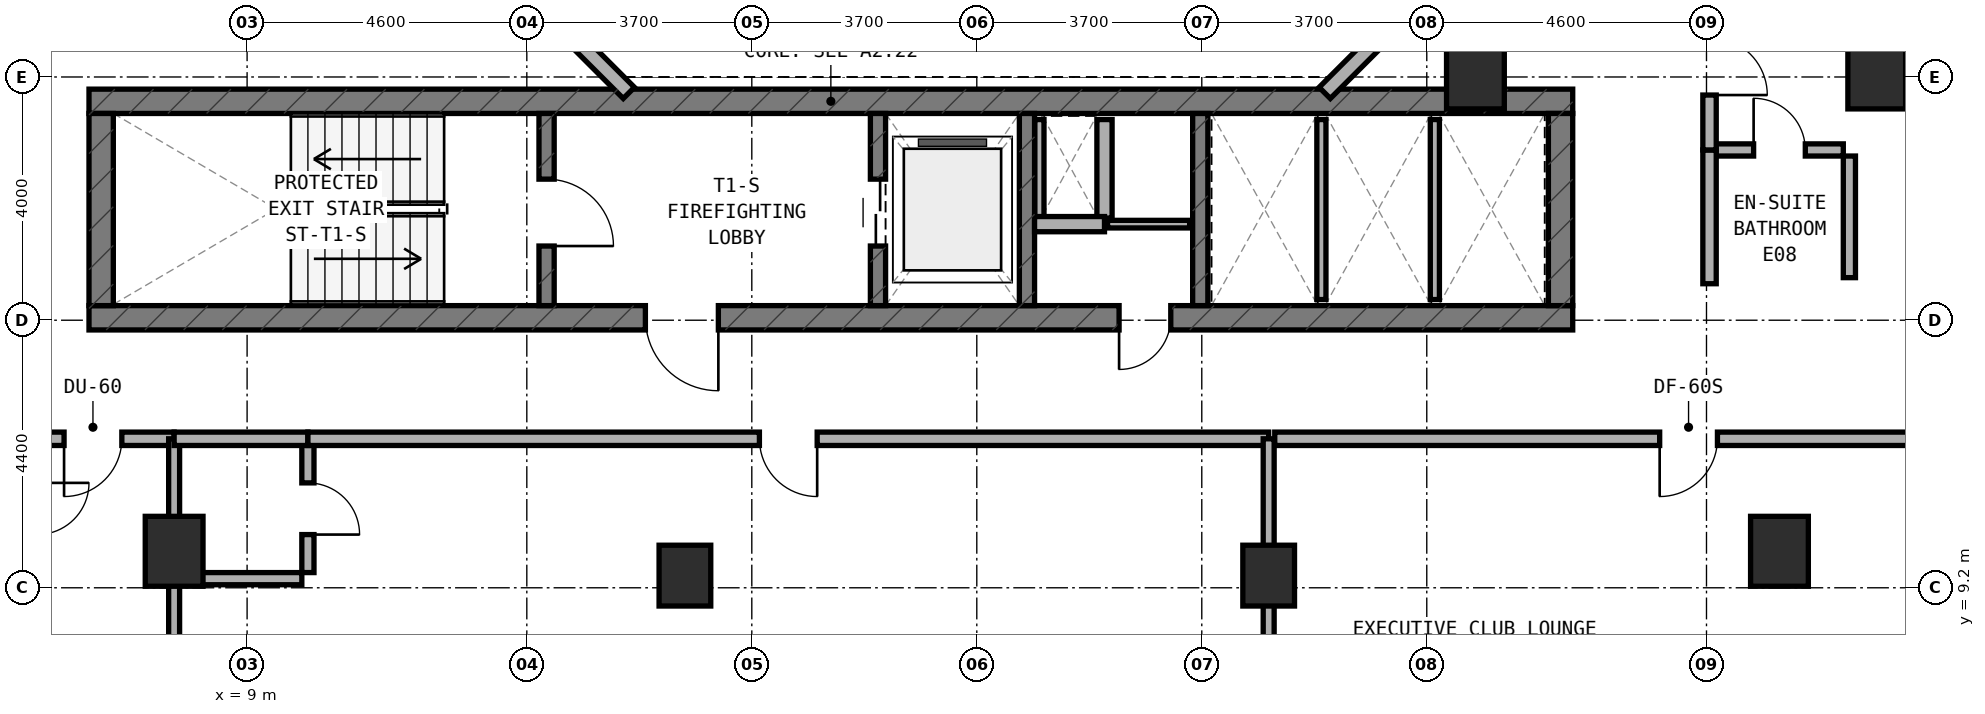
"""IFC4 building model, lengths in metres.
Left out: names, types, materials, properties, quantities, classifications, styles, units other than length and angle.
Written with IfcOpenShell. Run it as: python <this file> out.ifc"""

import sys

from ifc_helpers import new_model, si_unit, direction, frame, frame_2d, origin, origin_2d, place, context, subcontext, project, spatial, rectangle, extrude, element, fill, save


model = new_model("IFC4")
c1 = context("Model", 3, precision=1e-05, world=origin(), true_north=direction((0.0, 1.0)))
c2 = subcontext(c1, "Body", "Model", "MODEL_VIEW")
j1 = project(units=[si_unit("LENGTHUNIT", "METRE"), si_unit("PLANEANGLEUNIT", "RADIAN")], contexts=[c1])
p1 = place(None, origin())
s1 = spatial("IfcSite", under=j1, at=p1, CompositionType="ELEMENT")
p2 = place(p1, origin())
s2 = spatial("IfcBuilding", under=s1, at=p2, CompositionType="ELEMENT")
p3 = place(p2, frame((0.0, 0.0, 95.0)))
s3 = spatial("IfcBuildingStorey", under=s2, at=p3, CompositionType="ELEMENT", Elevation=95.0)
p4 = place(p3, frame((6.4, 13.64, 0.0), z_axis=(0.0, 0.0, 1.0), x_axis=(1.0, 0.0, 0.0)))
e1 = element("IfcWall", 1, at=p4, inside=s3, PredefinedType="SHEAR", context=c2, shape_type="SweptSolid", body=[
    extrude(rectangle(XDim=24.4, YDim=0.4, at=frame_2d((12.2, 0.0))), origin(), (0.0, 0.0, 1.0), 3.5),
])
p5 = place(p4, frame((9.15, 0.0, 0.0)))
e2 = element("IfcOpeningElement", 2, at=p5, cuts=e1, PredefinedType="OPENING", context=c2, shape_type="SweptSolid", body=[
    extrude(rectangle(XDim=1.2, YDim=2.15, at=frame_2d((0.6, 1.075))), frame((0.0, 0.21, 0.0), z_axis=(0.0, -1.0, 0.0), x_axis=(1.0, 0.0, 0.0)), (0.0, 0.0, 1.0), 0.42),
])
p6 = place(p4, frame((16.94, 0.0, 0.0)))
e3 = element("IfcOpeningElement", 3, at=p6, cuts=e1, PredefinedType="OPENING", context=c2, shape_type="SweptSolid", body=[
    extrude(rectangle(XDim=0.85, YDim=2.1, at=frame_2d((0.425, 1.05))), frame((0.0, 0.21, 0.0), z_axis=(0.0, -1.0, 0.0), x_axis=(1.0, 0.0, 0.0)), (0.0, 0.0, 1.0), 0.42),
])
p7 = place(p3, frame((6.4, 17.2, 0.0), z_axis=(0.0, 0.0, 1.0), x_axis=(1.0, 0.0, 0.0)))
e4 = element("IfcWall", 4, at=p7, inside=s3, PredefinedType="SHEAR", context=c2, shape_type="SweptSolid", body=[
    extrude(rectangle(XDim=24.4, YDim=0.4, at=frame_2d((12.2, 0.0))), origin(), (0.0, 0.0, 1.0), 3.5),
])
for number, where, z_axis, x_axis in (
    (5, (6.6, 13.84, 0.0), (0.0, 0.0, 1.0), (0.0, 1.0, 0.0)),
    (6, (30.6, 13.84, 0.0), (0.0, 0.0, 1.0), (0.0, 1.0, 0.0)),
):
    element("IfcWall", number, at=place(p3, frame(where, z_axis=z_axis, x_axis=x_axis)), inside=s3, PredefinedType="SHEAR", context=c2, shape_type="SweptSolid", body=[
        extrude(rectangle(XDim=3.16, YDim=0.4, at=frame_2d((1.58, 0.0))), origin(), (0.0, 0.0, 1.0), 3.5),
    ])
p8 = place(p3, frame((13.925, 13.84, 0.0), z_axis=(0.0, 0.0, 1.0), x_axis=(0.0, 1.0, 0.0)))
e7 = element("IfcWall", 7, at=p8, inside=s3, PredefinedType="STANDARD", context=c2, shape_type="SweptSolid", body=[
    extrude(rectangle(XDim=3.16, YDim=0.25, at=frame_2d((1.58, 0.0))), origin(), (0.0, 0.0, 1.0), 3.22),
])
p9 = place(p8, frame((0.98, 0.0, 0.0)))
e8 = element("IfcOpeningElement", 8, at=p9, cuts=e7, PredefinedType="OPENING", context=c2, shape_type="SweptSolid", body=[
    extrude(rectangle(XDim=1.1, YDim=2.15, at=frame_2d((0.55, 1.075))), frame((0.0, 0.135, 0.0), z_axis=(0.0, -1.0, 0.0), x_axis=(1.0, 0.0, 0.0)), (0.0, 0.0, 1.0), 0.27),
])
p10 = place(p3, frame((19.375, 13.84, 0.0), z_axis=(0.0, 0.0, 1.0), x_axis=(0.0, 1.0, 0.0)))
e9 = element("IfcWall", 9, at=p10, inside=s3, PredefinedType="STANDARD", context=c2, shape_type="SweptSolid", body=[
    extrude(rectangle(XDim=3.16, YDim=0.25, at=frame_2d((1.58, 0.0))), origin(), (0.0, 0.0, 1.0), 3.22),
])
p11 = place(p10, frame((0.98, 0.0, 0.0)))
e10 = element("IfcOpeningElement", 10, at=p11, cuts=e9, PredefinedType="OPENING", context=c2, shape_type="SweptSolid", body=[
    extrude(rectangle(XDim=1.1, YDim=2.15, at=frame_2d((0.55, 1.075))), frame((0.0, 0.135, 0.0), z_axis=(0.0, -1.0, 0.0), x_axis=(1.0, 0.0, 0.0)), (0.0, 0.0, 1.0), 0.27),
])
for number, where, z_axis, x_axis in (
    (11, (21.825, 13.84, 0.0), (0.0, 0.0, 1.0), (0.0, 1.0, 0.0)),
    (12, (24.675, 13.84, 0.0), (0.0, 0.0, 1.0), (0.0, 1.0, 0.0)),
):
    element("IfcWall", number, at=place(p3, frame(where, z_axis=z_axis, x_axis=x_axis)), inside=s3, PredefinedType="STANDARD", context=c2, shape_type="SweptSolid", body=[
        extrude(rectangle(XDim=3.16, YDim=0.25, at=frame_2d((1.58, 0.0))), origin(), (0.0, 0.0, 1.0), 3.22),
    ])
for number, where, z_axis, x_axis in (
    (13, (16.2, 9.4, 0.0), (0.0, 0.0, 1.0), (1.0, 0.0, 0.0)),
    (14, (25.8, 9.4, 0.0), (0.0, 0.0, 1.0), (1.0, 0.0, 0.0)),
):
    element("IfcColumn", number, at=place(p3, frame(where, z_axis=z_axis, x_axis=x_axis)), inside=s3, PredefinedType="COLUMN", context=c2, shape_type="SweptSolid", body=[
        extrude(rectangle(XDim=0.85, YDim=1.0, at=origin_2d()), origin(), (0.0, 0.0, 1.0), 3.5),
    ])
for number, where, z_axis, x_axis in (
    (15, (7.8, 9.8, 0.0), (0.0, 0.0, 1.0), (1.0, 0.0, 0.0)),
    (16, (34.2, 9.8, 0.0), (0.0, 0.0, 1.0), (1.0, 0.0, 0.0)),
    (17, (35.8, 17.65, 0.0), (0.0, 0.0, 1.0), (1.0, 0.0, 0.0)),
    (18, (29.2, 17.65, 0.0), (0.0, 0.0, 1.0), (1.0, 0.0, 0.0)),
):
    element("IfcColumn", number, at=place(p3, frame(where, z_axis=z_axis, x_axis=x_axis)), inside=s3, PredefinedType="COLUMN", context=c2, shape_type="SweptSolid", body=[
        extrude(rectangle(XDim=0.95, YDim=1.15, at=origin_2d()), origin(), (0.0, 0.0, 1.0), 3.5),
    ])
for number, where, z_axis, x_axis in (
    (19, (26.722, 17.338, 0.0), (0.0, 0.0, 1.0), (0.707, 0.707, 0.0)),
    (20, (13.444, 19.172, 0.0), (0.0, 0.0, 1.0), (0.707, -0.707, 0.0)),
):
    element("IfcWall", number, at=place(p3, frame(where, z_axis=z_axis, x_axis=x_axis)), inside=s3, PredefinedType="STANDARD", context=c2, shape_type="SweptSolid", body=[
        extrude(rectangle(XDim=2.594, YDim=0.26, at=frame_2d((1.297, 0.0))), origin(), (0.0, 0.0, 1.0), 3.22),
    ])
p12 = place(p3, frame((22.03, 15.28, 0.0), z_axis=(0.0, 0.0, 1.0), x_axis=(0.0, 1.0, 0.0)))
e21 = element("IfcWall", 21, at=p12, inside=s3, PredefinedType="PARTITIONING", context=c2, shape_type="SweptSolid", body=[
    extrude(rectangle(XDim=1.62, YDim=0.15, at=frame_2d((0.81, 0.0))), origin(), (0.0, 0.0, 1.0), 3.22),
])
p13 = place(p3, frame((23.1, 15.28, 0.0), z_axis=(0.0, 0.0, 1.0), x_axis=(0.0, 1.0, 0.0)))
e22 = element("IfcWall", 22, at=p13, inside=s3, PredefinedType="SOLIDWALL", context=c2, shape_type="SweptSolid", body=[
    extrude(rectangle(XDim=1.62, YDim=0.25, at=frame_2d((0.81, 0.0))), origin(), (0.0, 0.0, 1.0), 3.22),
])
p14 = place(p3, frame((21.95, 15.18, 0.0), z_axis=(0.0, 0.0, 1.0), x_axis=(1.0, 0.0, 0.0)))
e23 = element("IfcWall", 23, at=p14, inside=s3, PredefinedType="SOLIDWALL", context=c2, shape_type="SweptSolid", body=[
    extrude(rectangle(XDim=1.15, YDim=0.25, at=frame_2d((0.575, 0.0))), origin(), (0.0, 0.0, 1.0), 3.22),
])
p15 = place(p3, frame((23.15, 15.18, 0.0), z_axis=(0.0, 0.0, 1.0), x_axis=(1.0, 0.0, 0.0)))
e24 = element("IfcWall", 24, at=p15, inside=s3, PredefinedType="PARTITIONING", context=c2, shape_type="SweptSolid", body=[
    extrude(rectangle(XDim=1.35, YDim=0.125, at=frame_2d((0.675, 0.0))), origin(), (0.0, 0.0, 1.0), 3.22),
])
p16 = place(p3, frame((26.667, 13.94, 0.0), z_axis=(0.0, 0.0, 1.0), x_axis=(0.0, 1.0, 0.0)))
e25 = element("IfcWall", 25, at=p16, inside=s3, PredefinedType="PARTITIONING", context=c2, shape_type="SweptSolid", body=[
    extrude(rectangle(XDim=2.96, YDim=0.15, at=frame_2d((1.48, 0.0))), origin(), (0.0, 0.0, 1.0), 3.22),
])
p17 = place(p3, frame((28.533, 13.94, 0.0), z_axis=(0.0, 0.0, 1.0), x_axis=(0.0, 1.0, 0.0)))
e26 = element("IfcWall", 26, at=p17, inside=s3, PredefinedType="PARTITIONING", context=c2, shape_type="SweptSolid", body=[
    extrude(rectangle(XDim=2.96, YDim=0.15, at=frame_2d((1.48, 0.0))), origin(), (0.0, 0.0, 1.0), 2.595),
])
p18 = place(p3, frame((5.55, 11.65, 0.0), z_axis=(0.0, 0.0, 1.0), x_axis=(1.0, 0.0, 0.0)))
e27 = element("IfcWall", 27, at=p18, inside=s3, PredefinedType="SOLIDWALL", context=c2, shape_type="SweptSolid", body=[
    extrude(rectangle(XDim=2.25, YDim=0.22, at=frame_2d((1.125, 0.0))), origin(), (0.0, 0.0, 1.0), 2.595),
])
p19 = place(p18, frame((0.44, 0.0, 0.0)))
e28 = element("IfcOpeningElement", 28, at=p19, cuts=e27, PredefinedType="OPENING", context=c2, shape_type="SweptSolid", body=[
    extrude(rectangle(XDim=0.95, YDim=2.1, at=frame_2d((0.475, 1.05))), frame((0.0, 0.12, 0.0), z_axis=(0.0, -1.0, 0.0), x_axis=(1.0, 0.0, 0.0)), (0.0, 0.0, 1.0), 0.24),
])
p20 = place(p3, frame((7.8, 6.299, 0.0), z_axis=(0.0, 0.0, 1.0), x_axis=(0.0, 1.0, 0.0)))
e29 = element("IfcWall", 29, at=p20, inside=s3, PredefinedType="SOLIDWALL", context=c2, shape_type="SweptSolid", body=[
    extrude(rectangle(XDim=5.351, YDim=0.18, at=frame_2d((2.675, 0.0))), origin(), (0.0, 0.0, 1.0), 2.595),
])
p21 = place(p3, frame((10.0, 9.45, 0.0), z_axis=(0.0, 0.0, 1.0), x_axis=(0.0, 1.0, 0.0)))
e30 = element("IfcWall", 30, at=p21, inside=s3, PredefinedType="PLUMBINGWALL", context=c2, shape_type="SweptSolid", body=[
    extrude(rectangle(XDim=2.1, YDim=0.2, at=frame_2d((1.05, 0.0))), origin(), (0.0, 0.0, 1.0), 2.835),
])
p22 = place(p21, frame((0.625, 0.0, 0.0)))
e31 = element("IfcOpeningElement", 31, at=p22, cuts=e30, PredefinedType="OPENING", context=c2, shape_type="SweptSolid", body=[
    extrude(rectangle(XDim=0.85, YDim=2.1, at=frame_2d((0.425, 1.05))), frame((0.0, 0.11, 0.0), z_axis=(0.0, -1.0, 0.0), x_axis=(1.0, 0.0, 0.0)), (0.0, 0.0, 1.0), 0.22),
])
p23 = place(p3, frame((7.9, 9.35, 0.0), z_axis=(0.0, 0.0, 1.0), x_axis=(1.0, 0.0, 0.0)))
e32 = element("IfcWall", 32, at=p23, inside=s3, PredefinedType="PLUMBINGWALL", context=c2, shape_type="SweptSolid", body=[
    extrude(rectangle(XDim=2.0, YDim=0.2, at=frame_2d((1.0, 0.0))), origin(), (0.0, 0.0, 1.0), 3.22),
])
p24 = place(p3, frame((7.8, 11.65, 0.0), z_axis=(0.0, 0.0, 1.0), x_axis=(1.0, 0.0, 0.0)))
e33 = element("IfcWall", 33, at=p24, inside=s3, PredefinedType="SOLIDWALL", context=c2, shape_type="SweptSolid", body=[
    extrude(rectangle(XDim=2.2, YDim=0.22, at=frame_2d((1.1, 0.0))), origin(), (0.0, 0.0, 1.0), 2.595),
])
p25 = place(p3, frame((10.0, 11.65, 0.0), z_axis=(0.0, 0.0, 1.0), x_axis=(1.0, 0.0, 0.0)))
e34 = element("IfcWall", 34, at=p25, inside=s3, PredefinedType="SOLIDWALL", context=c2, shape_type="SweptSolid", body=[
    extrude(rectangle(XDim=15.8, YDim=0.22, at=frame_2d((7.9, 0.0))), origin(), (0.0, 0.0, 1.0), 2.595),
])
p26 = place(p25, frame((7.425, 0.0, 0.0)))
e35 = element("IfcOpeningElement", 35, at=p26, cuts=e34, PredefinedType="OPENING", context=c2, shape_type="SweptSolid", body=[
    extrude(rectangle(XDim=0.95, YDim=2.1, at=frame_2d((0.475, 1.05))), frame((0.0, 0.12, 0.0), z_axis=(0.0, -1.0, 0.0), x_axis=(1.0, 0.0, 0.0)), (0.0, 0.0, 1.0), 0.24),
])
p27 = place(p3, frame((25.8, 4.86, 0.0), z_axis=(0.0, 0.0, 1.0), x_axis=(0.0, 1.0, 0.0)))
e36 = element("IfcWall", 36, at=p27, inside=s3, PredefinedType="SOLIDWALL", context=c2, shape_type="SweptSolid", body=[
    extrude(rectangle(XDim=6.79, YDim=0.18, at=frame_2d((3.395, 0.0))), origin(), (0.0, 0.0, 1.0), 2.595),
])
p28 = place(p3, frame((25.9, 11.65, 0.0), z_axis=(0.0, 0.0, 1.0), x_axis=(1.0, 0.0, 0.0)))
e37 = element("IfcWall", 37, at=p28, inside=s3, PredefinedType="SOLIDWALL", context=c2, shape_type="SweptSolid", body=[
    extrude(rectangle(XDim=15.04, YDim=0.22, at=frame_2d((7.52, 0.0))), origin(), (0.0, 0.0, 1.0), 2.595),
])
p29 = place(p28, frame((6.33, 0.0, 0.0)))
e38 = element("IfcOpeningElement", 38, at=p29, cuts=e37, PredefinedType="OPENING", context=c2, shape_type="SweptSolid", body=[
    extrude(rectangle(XDim=0.95, YDim=2.1, at=frame_2d((0.475, 1.05))), frame((0.0, 0.12, 0.0), z_axis=(0.0, -1.0, 0.0), x_axis=(1.0, 0.0, 0.0)), (0.0, 0.0, 1.0), 0.24),
])
p30 = place(p3, frame((33.15, 16.4, 0.0), z_axis=(0.0, 0.0, 1.0), x_axis=(1.0, 0.0, 0.0)))
e39 = element("IfcWall", 39, at=p30, inside=s3, PredefinedType="PLUMBINGWALL", context=c2, shape_type="SweptSolid", body=[
    extrude(rectangle(XDim=2.1, YDim=0.2, at=frame_2d((1.05, 0.0))), origin(), (0.0, 0.0, 1.0), 3.22),
])
p31 = place(p30, frame((0.625, 0.0, 0.0)))
e40 = element("IfcOpeningElement", 40, at=p31, cuts=e39, PredefinedType="OPENING", context=c2, shape_type="SweptSolid", body=[
    extrude(rectangle(XDim=0.85, YDim=2.1, at=frame_2d((0.425, 1.05))), frame((0.0, 0.11, 0.0), z_axis=(0.0, -1.0, 0.0), x_axis=(1.0, 0.0, 0.0)), (0.0, 0.0, 1.0), 0.22),
])
p32 = place(p3, frame((35.35, 14.3, 0.0), z_axis=(0.0, 0.0, 1.0), x_axis=(0.0, 1.0, 0.0)))
e41 = element("IfcWall", 41, at=p32, inside=s3, PredefinedType="PLUMBINGWALL", context=c2, shape_type="SweptSolid", body=[
    extrude(rectangle(XDim=2.0, YDim=0.2, at=frame_2d((1.0, 0.0))), origin(), (0.0, 0.0, 1.0), 2.835),
])
p33 = place(p3, frame((33.05, 14.2, 0.0), z_axis=(0.0, 0.0, 1.0), x_axis=(0.0, 1.0, 0.0)))
e42 = element("IfcWall", 42, at=p33, inside=s3, PredefinedType="SOLIDWALL", context=c2, shape_type="SweptSolid", body=[
    extrude(rectangle(XDim=2.2, YDim=0.22, at=frame_2d((1.1, 0.0))), origin(), (0.0, 0.0, 1.0), 3.22),
])
p34 = place(p3, frame((33.05, 16.4, 0.0), z_axis=(0.0, 0.0, 1.0), x_axis=(0.0, 1.0, 0.0)))
e43 = element("IfcWall", 43, at=p34, inside=s3, PredefinedType="SOLIDWALL", context=c2, shape_type="SweptSolid", body=[
    extrude(rectangle(XDim=2.756, YDim=0.22, at=frame_2d((1.378, 0.0))), origin(), (0.0, 0.0, 1.0), 2.595),
])
p35 = place(p34, frame((0.903, 0.0, 0.0)))
e44 = element("IfcOpeningElement", 44, at=p35, cuts=e43, PredefinedType="OPENING", context=c2, shape_type="SweptSolid", body=[
    extrude(rectangle(XDim=0.95, YDim=2.1, at=frame_2d((0.475, 1.05))), frame((0.0, 0.12, 0.0), z_axis=(0.0, -1.0, 0.0), x_axis=(1.0, 0.0, 0.0)), (0.0, 0.0, 1.0), 0.24),
])
p36 = place(p9, frame((1.1, 0.0, 0.0), z_axis=(0.0, 0.0, 1.0), x_axis=(-1.0, 0.0, 0.0)))
e45 = element("IfcDoor", 45, at=p36, inside=s3, OperationType="SINGLE_SWING_RIGHT", PredefinedType="DOOR", context=c2, shape_type="SweptSolid", body=[
    extrude(rectangle(XDim=1.1, YDim=2.15, at=frame_2d((0.55, 1.075))), frame((0.0, 0.025, 0.0), z_axis=(0.0, -1.0, 0.0), x_axis=(1.0, 0.0, 0.0)), (0.0, 0.0, 1.0), 0.05),
])
fill(e8, e45)
p37 = place(p5, frame((1.2, 0.0, 0.0), z_axis=(0.0, 0.0, 1.0), x_axis=(-1.0, 0.0, 0.0)))
e46 = element("IfcDoor", 46, at=p37, inside=s3, OperationType="SINGLE_SWING_LEFT", PredefinedType="DOOR", context=c2, shape_type="SweptSolid", body=[
    extrude(rectangle(XDim=1.2, YDim=2.15, at=frame_2d((0.6, 1.075))), frame((0.0, 0.025, 0.0), z_axis=(0.0, -1.0, 0.0), x_axis=(1.0, 0.0, 0.0)), (0.0, 0.0, 1.0), 0.05),
])
fill(e2, e46)
p38 = place(p11, origin())
e47 = element("IfcDoor", 47, at=p38, inside=s3, OperationType="DOUBLE_DOOR_SLIDING", PredefinedType="DOOR", context=c2, shape_type="SweptSolid", body=[
    extrude(rectangle(XDim=1.1, YDim=2.15, at=frame_2d((0.55, 1.075))), frame((0.0, 0.025, 0.0), z_axis=(0.0, -1.0, 0.0), x_axis=(1.0, 0.0, 0.0)), (0.0, 0.0, 1.0), 0.05),
])
fill(e10, e47)
p39 = place(p6, frame((0.85, 0.0, 0.0), z_axis=(0.0, 0.0, 1.0), x_axis=(-1.0, 0.0, 0.0)))
e48 = element("IfcDoor", 48, at=p39, inside=s3, OperationType="SINGLE_SWING_RIGHT", PredefinedType="DOOR", context=c2, shape_type="SweptSolid", body=[
    extrude(rectangle(XDim=0.85, YDim=2.1, at=frame_2d((0.425, 1.05))), frame((0.0, 0.025, 0.0), z_axis=(0.0, -1.0, 0.0), x_axis=(1.0, 0.0, 0.0)), (0.0, 0.0, 1.0), 0.05),
])
fill(e3, e48)
p40 = place(p19, frame((0.95, 0.0, 0.0), z_axis=(0.0, 0.0, 1.0), x_axis=(-1.0, 0.0, 0.0)))
e49 = element("IfcDoor", 49, at=p40, inside=s3, OperationType="SINGLE_SWING_RIGHT", PredefinedType="DOOR", context=c2, shape_type="SweptSolid", body=[
    extrude(rectangle(XDim=0.95, YDim=2.1, at=frame_2d((0.475, 1.05))), frame((0.0, 0.025, 0.0), z_axis=(0.0, -1.0, 0.0), x_axis=(1.0, 0.0, 0.0)), (0.0, 0.0, 1.0), 0.05),
])
fill(e28, e49)
p41 = place(p22, frame((0.85, 0.0, 0.0), z_axis=(0.0, 0.0, 1.0), x_axis=(-1.0, 0.0, 0.0)))
e50 = element("IfcDoor", 50, at=p41, inside=s3, OperationType="SINGLE_SWING_RIGHT", PredefinedType="DOOR", context=c2, shape_type="SweptSolid", body=[
    extrude(rectangle(XDim=0.85, YDim=2.1, at=frame_2d((0.425, 1.05))), frame((0.0, 0.025, 0.0), z_axis=(0.0, -1.0, 0.0), x_axis=(1.0, 0.0, 0.0)), (0.0, 0.0, 1.0), 0.05),
])
fill(e31, e50)
p42 = place(p26, frame((0.95, 0.0, 0.0), z_axis=(0.0, 0.0, 1.0), x_axis=(-1.0, 0.0, 0.0)))
e51 = element("IfcDoor", 51, at=p42, inside=s3, OperationType="SINGLE_SWING_LEFT", PredefinedType="DOOR", context=c2, shape_type="SweptSolid", body=[
    extrude(rectangle(XDim=0.95, YDim=2.1, at=frame_2d((0.475, 1.05))), frame((0.0, 0.025, 0.0), z_axis=(0.0, -1.0, 0.0), x_axis=(1.0, 0.0, 0.0)), (0.0, 0.0, 1.0), 0.05),
])
fill(e35, e51)
p43 = place(p29, frame((0.95, 0.0, 0.0), z_axis=(0.0, 0.0, 1.0), x_axis=(-1.0, 0.0, 0.0)))
e52 = element("IfcDoor", 52, at=p43, inside=s3, OperationType="SINGLE_SWING_RIGHT", PredefinedType="DOOR", context=c2, shape_type="SweptSolid", body=[
    extrude(rectangle(XDim=0.95, YDim=2.1, at=frame_2d((0.475, 1.05))), frame((0.0, 0.025, 0.0), z_axis=(0.0, -1.0, 0.0), x_axis=(1.0, 0.0, 0.0)), (0.0, 0.0, 1.0), 0.05),
])
fill(e38, e52)
p44 = place(p31, origin())
e53 = element("IfcDoor", 53, at=p44, inside=s3, OperationType="SINGLE_SWING_LEFT", PredefinedType="DOOR", context=c2, shape_type="SweptSolid", body=[
    extrude(rectangle(XDim=0.85, YDim=2.1, at=frame_2d((0.425, 1.05))), frame((0.0, 0.025, 0.0), z_axis=(0.0, -1.0, 0.0), x_axis=(1.0, 0.0, 0.0)), (0.0, 0.0, 1.0), 0.05),
])
fill(e40, e53)
p45 = place(p35, frame((0.95, 0.0, 0.0), z_axis=(0.0, 0.0, 1.0), x_axis=(-1.0, 0.0, 0.0)))
e54 = element("IfcDoor", 54, at=p45, inside=s3, OperationType="SINGLE_SWING_RIGHT", PredefinedType="DOOR", context=c2, shape_type="SweptSolid", body=[
    extrude(rectangle(XDim=0.95, YDim=2.1, at=frame_2d((0.475, 1.05))), frame((0.0, 0.025, 0.0), z_axis=(0.0, -1.0, 0.0), x_axis=(1.0, 0.0, 0.0)), (0.0, 0.0, 1.0), 0.05),
])
fill(e44, e54)
save(model, sys.argv[1])
